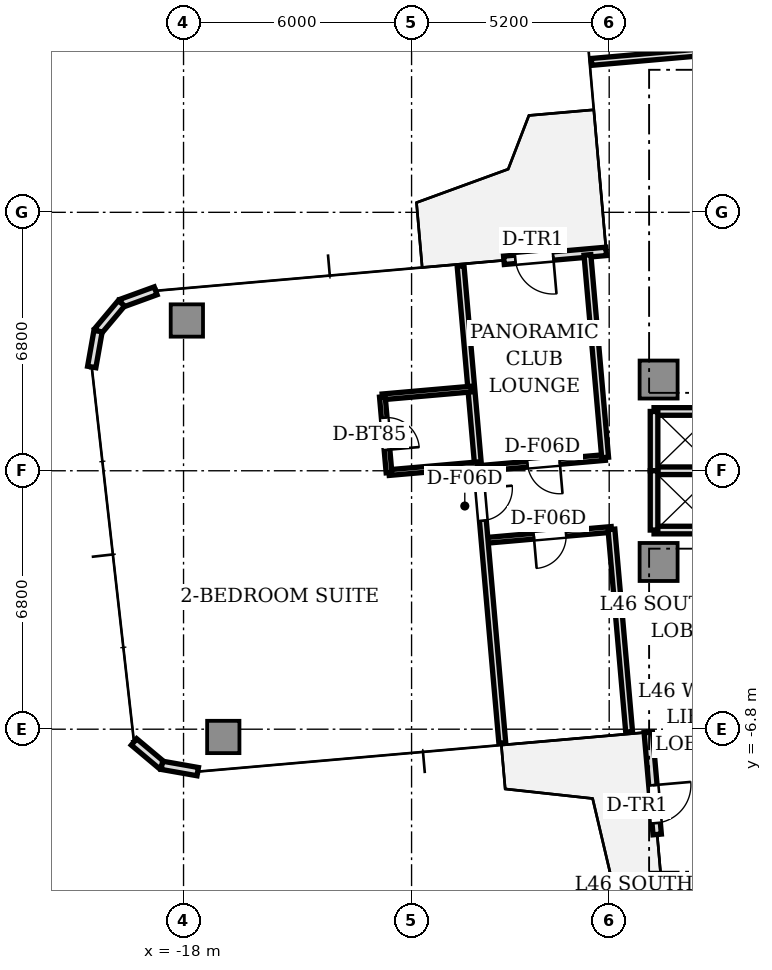
"""IFC4 building model, lengths in metres.
Left out: names, types, materials, properties, quantities, classifications, styles, units other than length and angle.
Written with IfcOpenShell. Run it as: python <this file> out.ifc"""

import sys

from ifc_helpers import new_model, si_unit, direction, frame, frame_2d, origin, origin_2d, place, context, subcontext, project, spatial, rectangle, extrude, source, transform, mapped, element, fill, save


model = new_model("IFC4")
c1 = context("Model", 3, precision=1e-05, world=origin(), true_north=direction((0.0, 1.0)))
c2 = subcontext(c1, "Body", "Model", "MODEL_VIEW")
j1 = project(units=[si_unit("LENGTHUNIT", "METRE"), si_unit("PLANEANGLEUNIT", "RADIAN")], contexts=[c1])
p1 = place(None, origin())
s1 = spatial("IfcSite", under=j1, at=p1, CompositionType="ELEMENT")
p2 = place(p1, origin())
s2 = spatial("IfcBuilding", under=s1, at=p2, CompositionType="ELEMENT")
p3 = place(p2, frame((0.0, 0.0, 167.35)))
s3 = spatial("IfcBuildingStorey", under=s2, at=p3, CompositionType="ELEMENT", Elevation=167.35)
m1 = source(origin(), c2, "Body", "SweptSolid", [
    extrude(rectangle(XDim=1.0, YDim=1.0, at=origin_2d()), origin(), (0.0, 0.0, 1.0), 3.05),
])
for number, where, z_axis, x_axis in (
    (1, (-5.5, 2.4, 0.0), (0.0, 0.0, 1.0), (1.0, 0.0, 0.0)),
    (2, (-5.5, -2.4, 0.0), (0.0, 0.0, 1.0), (1.0, 0.0, 0.0)),
):
    element("IfcColumn", number, at=place(p3, frame(where, z_axis=z_axis, x_axis=x_axis)), inside=s3, PredefinedType="COLUMN", context=c2, shape_type="MappedRepresentation", body=[
        mapped(m1, transform((0.0, 0.0, 0.0), scale=1.0)),
    ])
m2 = source(origin(), c2, "Body", "SweptSolid", [
    extrude(rectangle(XDim=0.85, YDim=0.85, at=origin_2d()), origin(), (0.0, 0.0, 1.0), 3.05),
])
for number, where, z_axis, x_axis in (
    (3, (-17.913, 3.954, 0.0), (0.0, 0.0, 1.0), (1.0, 0.0, 0.0)),
    (4, (-16.954, -7.004, 0.0), (0.0, 0.0, 1.0), (1.0, 0.0, 0.0)),
):
    element("IfcColumn", number, at=place(p3, frame(where, z_axis=z_axis, x_axis=x_axis)), inside=s3, PredefinedType="COLUMN", context=c2, shape_type="MappedRepresentation", body=[
        mapped(m2, transform((0.0, 0.0, 0.0), scale=1.0)),
    ])
p4 = place(p3, frame((-6.879, 5.772, 0.0), z_axis=(0.0, 0.0, 1.0), x_axis=(-0.996193619346, -0.087168071984, 0.0)))
e5 = element("IfcWall", 5, at=p4, inside=s3, PredefinedType="STANDARD", context=c2, shape_type="SweptSolid", body=[
    extrude(rectangle(XDim=2.7, YDim=0.22, at=frame_2d((1.35, 0.0))), origin(), (0.0, 0.0, 1.0), 3.05),
])
p5 = place(p4, frame((1.4, 0.0, 0.0)))
e6 = element("IfcOpeningElement", 6, at=p5, cuts=e5, PredefinedType="OPENING", context=c2, shape_type="SweptSolid", body=[
    extrude(rectangle(XDim=1.0, YDim=2.2, at=frame_2d((0.5, 1.1))), frame((0.0, 0.12, 0.0), z_axis=(0.0, -1.0, 0.0), x_axis=(1.0, 0.0, 0.0)), (0.0, 0.0, 1.0), 0.24),
])
p6 = place(p3, frame((-18.734, 4.735, 0.0), z_axis=(0.0, 0.0, 1.0), x_axis=(-0.939741306239, -0.34188635151, 0.0)))
e7 = element("IfcWall", 7, at=p6, inside=s3, PredefinedType="STANDARD", context=c2, shape_type="SweptSolid", body=[
    extrude(rectangle(XDim=0.958, YDim=0.22, at=frame_2d((0.479, 0.0))), origin(), (0.0, 0.0, 1.0), 3.05),
])
for number, where, z_axis, x_axis in (
    (8, (-19.634, 4.408, 0.0), (0.0, 0.0, 1.0), (-0.643, -0.766, 0.0)),
    (9, (-20.25, 3.674, 0.0), (0.0, 0.0, 1.0), (-0.174, -0.985, 0.0)),
):
    element("IfcWall", number, at=place(p3, frame(where, z_axis=z_axis, x_axis=x_axis)), inside=s3, PredefinedType="STANDARD", context=c2, shape_type="SweptSolid", body=[
        extrude(rectangle(XDim=0.958, YDim=0.22, at=frame_2d((0.479, 0.0))), origin(), (0.0, 0.0, 1.0), 3.05),
    ])
p7 = place(p3, frame((-19.304, -7.135, 0.0), z_axis=(0.0, 0.0, 1.0), x_axis=(0.766001159887, -0.642839189107, 0.0)))
e10 = element("IfcWall", 10, at=p7, inside=s3, PredefinedType="STANDARD", context=c2, shape_type="SweptSolid", body=[
    extrude(rectangle(XDim=0.958, YDim=0.22, at=frame_2d((0.479, 0.0))), origin(), (0.0, 0.0, 1.0), 3.05),
])
p8 = place(p3, frame((-18.57, -7.75, 0.0), z_axis=(0.0, 0.0, 1.0), x_axis=(0.984770724397, -0.173858046606, 0.0)))
e11 = element("IfcWall", 11, at=p8, inside=s3, PredefinedType="STANDARD", context=c2, shape_type="SweptSolid", body=[
    extrude(rectangle(XDim=0.958, YDim=0.22, at=frame_2d((0.479, 0.0))), origin(), (0.0, 0.0, 1.0), 3.05),
])
p9 = place(p3, frame((-5.772, -6.879, 0.0), z_axis=(0.0, 0.0, 1.0), x_axis=(0.087168071984, -0.996193619346, 0.0)))
e12 = element("IfcWall", 12, at=p9, inside=s3, PredefinedType="STANDARD", context=c2, shape_type="SweptSolid", body=[
    extrude(rectangle(XDim=2.7, YDim=0.22, at=frame_2d((1.35, 0.0))), origin(), (0.0, 0.0, 1.0), 3.05),
])
p10 = place(p9, frame((1.4, 0.0, 0.0)))
e13 = element("IfcOpeningElement", 13, at=p10, cuts=e12, PredefinedType="OPENING", context=c2, shape_type="SweptSolid", body=[
    extrude(rectangle(XDim=1.0, YDim=2.2, at=frame_2d((0.5, 1.1))), frame((0.0, 0.12, 0.0), z_axis=(0.0, -1.0, 0.0), x_axis=(1.0, 0.0, 0.0)), (0.0, 0.0, 1.0), 0.24),
])
for number, where, z_axis, x_axis in (
    (14, (-5.62, 1.56, 0.0), (0.0, 0.0, 1.0), (1.0, 0.0, 0.0)),
    (15, (-5.62, -1.56, 0.0), (0.0, 0.0, 1.0), (1.0, 0.0, 0.0)),
    (16, (-5.62, 0.0, 0.0), (0.0, 0.0, 1.0), (1.0, 0.0, 0.0)),
):
    element("IfcWall", number, at=place(p3, frame(where, z_axis=z_axis, x_axis=x_axis)), inside=s3, PredefinedType="SOLIDWALL", context=c2, shape_type="SweptSolid", body=[
        extrude(rectangle(XDim=1.64, YDim=0.2, at=frame_2d((0.82, 0.0))), origin(), (0.0, 0.0, 1.0), 2.6),
    ])
for number, where, z_axis, x_axis in (
    (17, (-5.62, 0.0, 0.0), (0.0, 0.0, 1.0), (0.0, 1.0, 0.0)),
    (18, (-5.62, -1.56, 0.0), (0.0, 0.0, 1.0), (0.0, 1.0, 0.0)),
):
    element("IfcWall", number, at=place(p3, frame(where, z_axis=z_axis, x_axis=x_axis)), inside=s3, PredefinedType="SOLIDWALL", context=c2, shape_type="SweptSolid", body=[
        extrude(rectangle(XDim=1.56, YDim=0.2, at=frame_2d((0.78, 0.0))), origin(), (0.0, 0.0, 1.0), 2.6),
    ])
p11 = place(p3, frame((3.095, 11.664, 0.0), z_axis=(0.0, 0.0, 1.0), x_axis=(-0.996196061386, -0.087140158824, 0.0)))
e19 = element("IfcWall", 19, at=p11, inside=s3, PredefinedType="PARTITIONING", context=c2, shape_type="SweptSolid", body=[
    extrude(rectangle(XDim=10.4, YDim=0.18, at=frame_2d((5.2, 0.0))), origin(), (0.0, 0.0, 1.0), 2.6),
])
p12 = place(p3, frame((-6.741, -1.543, 0.0), z_axis=(0.0, 0.0, 1.0), x_axis=(-0.996193954812, -0.087164238054, 0.0)))
e20 = element("IfcWall", 20, at=p12, inside=s3, PredefinedType="PARTITIONING", context=c2, shape_type="SweptSolid", body=[
    extrude(rectangle(XDim=3.35, YDim=0.15, at=frame_2d((1.675, 0.0))), origin(), (0.0, 0.0, 1.0), 2.6),
])
p13 = place(p12, frame((1.2, 0.0, 0.0)))
e21 = element("IfcOpeningElement", 21, at=p13, cuts=e20, PredefinedType="OPENING", context=c2, shape_type="SweptSolid", body=[
    extrude(rectangle(XDim=0.85, YDim=2.1, at=frame_2d((0.425, 1.05))), frame((0.0, 0.085, 0.0), z_axis=(0.0, -1.0, 0.0), x_axis=(1.0, 0.0, 0.0)), (0.0, 0.0, 1.0), 0.17),
])
p14 = place(p3, frame((-6.907, 0.349, 0.0), z_axis=(0.0, 0.0, 1.0), x_axis=(-0.996193954812, -0.087164238054, 0.0)))
e22 = element("IfcWall", 22, at=p14, inside=s3, PredefinedType="PARTITIONING", context=c2, shape_type="SweptSolid", body=[
    extrude(rectangle(XDim=3.35, YDim=0.15, at=frame_2d((1.675, 0.0))), origin(), (0.0, 0.0, 1.0), 2.6),
])
p15 = place(p14, frame((1.2, 0.0, 0.0)))
e23 = element("IfcOpeningElement", 23, at=p15, cuts=e22, PredefinedType="OPENING", context=c2, shape_type="SweptSolid", body=[
    extrude(rectangle(XDim=0.85, YDim=2.1, at=frame_2d((0.425, 1.05))), frame((0.0, 0.085, 0.0), z_axis=(0.0, -1.0, 0.0), x_axis=(1.0, 0.0, 0.0)), (0.0, 0.0, 1.0), 0.17),
])
for number, where, z_axis, x_axis in (
    (24, (-6.741, -1.543, 0.0), (0.0, 0.0, 1.0), (0.087, -0.996, 0.0)),
    (25, (-7.373, 5.679, 0.0), (0.0, 0.0, 1.0), (0.087, -0.996, 0.0)),
):
    element("IfcWall", number, at=place(p3, frame(where, z_axis=z_axis, x_axis=x_axis)), inside=s3, PredefinedType="PARTITIONING", context=c2, shape_type="SweptSolid", body=[
        extrude(rectangle(XDim=5.35, YDim=0.18, at=frame_2d((2.675, 0.0))), origin(), (0.0, 0.0, 1.0), 2.6),
    ])
p16 = place(p3, frame((-10.71, 5.387, 0.0), z_axis=(0.0, 0.0, 1.0), x_axis=(0.087154691724, -0.996194790044, 0.0)))
e26 = element("IfcWall", 26, at=p16, inside=s3, PredefinedType="PARTITIONING", context=c2, shape_type="SweptSolid", body=[
    extrude(rectangle(XDim=12.6, YDim=0.18, at=frame_2d((6.3, 0.0))), origin(), (0.0, 0.0, 1.0), 2.6),
])
p17 = place(p16, frame((5.875, 0.0, 0.0)))
e27 = element("IfcOpeningElement", 27, at=p17, cuts=e26, PredefinedType="OPENING", context=c2, shape_type="SweptSolid", body=[
    extrude(rectangle(XDim=0.85, YDim=2.1, at=frame_2d((0.425, 1.05))), frame((0.0, 0.1, 0.0), z_axis=(0.0, -1.0, 0.0), x_axis=(1.0, 0.0, 0.0)), (0.0, 0.0, 1.0), 0.2),
])
for number, where, z_axis, x_axis in (
    (28, (-10.253, 0.157, 0.0), (0.0, 0.0, 1.0), (-0.996, -0.087, 0.0)),
    (29, (-10.427, 2.149, 0.0), (0.0, 0.0, 1.0), (-0.996, -0.087, 0.0)),
):
    element("IfcWall", number, at=place(p3, frame(where, z_axis=z_axis, x_axis=x_axis)), inside=s3, PredefinedType="PARTITIONING", context=c2, shape_type="SweptSolid", body=[
        extrude(rectangle(XDim=2.35, YDim=0.15, at=frame_2d((1.175, 0.0))), origin(), (0.0, 0.0, 1.0), 2.6),
    ])
p18 = place(p3, frame((-12.768, 1.945, 0.0), z_axis=(0.0, 0.0, 1.0), x_axis=(0.087156350505, -0.99619464492, 0.0)))
e30 = element("IfcWall", 30, at=p18, inside=s3, PredefinedType="PARTITIONING", context=c2, shape_type="SweptSolid", body=[
    extrude(rectangle(XDim=2.0, YDim=0.15, at=frame_2d((1.0, 0.0))), origin(), (0.0, 0.0, 1.0), 2.6),
])
p19 = place(p18, frame((0.55, 0.0, 0.0)))
e31 = element("IfcOpeningElement", 31, at=p19, cuts=e30, PredefinedType="OPENING", context=c2, shape_type="SweptSolid", body=[
    extrude(rectangle(XDim=0.85, YDim=2.1, at=frame_2d((0.425, 1.05))), frame((0.0, 0.085, 0.0), z_axis=(0.0, -1.0, 0.0), x_axis=(1.0, 0.0, 0.0)), (0.0, 0.0, 1.0), 0.17),
])
p20 = place(p3, frame((-5.287, -11.856, 0.0), z_axis=(0.0, 0.0, 1.0), x_axis=(0.996194023261, 0.087163455754, 0.0)))
e32 = element("IfcWall", 32, at=p20, inside=s3, PredefinedType="PARTITIONING", context=c2, shape_type="SweptSolid", body=[
    extrude(rectangle(XDim=10.4, YDim=0.18, at=frame_2d((5.2, 0.0))), origin(), (0.0, 0.0, 1.0), 2.6),
])
m3 = source(origin(), c2, "Body", "SweptSolid", [
    extrude(rectangle(XDim=1.0, YDim=0.05, at=origin_2d()), origin(), (0.0, 0.0, 1.0), 2.2),
])
p21 = place(p5, frame((0.5, 0.0, 0.0)))
e33 = element("IfcDoor", 33, at=p21, inside=s3, OperationType="SINGLE_SWING_LEFT", PredefinedType="DOOR", context=c2, shape_type="MappedRepresentation", body=[
    mapped(m3, transform((0.0, 0.0, 0.0), scale=1.0)),
])
fill(e6, e33)
p22 = place(p10, frame((0.5, 0.0, 0.0)))
e34 = element("IfcDoor", 34, at=p22, inside=s3, OperationType="SINGLE_SWING_LEFT", PredefinedType="DOOR", context=c2, shape_type="MappedRepresentation", body=[
    mapped(m3, transform((0.0, 0.0, 0.0), scale=1.0)),
])
fill(e13, e34)
m4 = source(origin(), c2, "Body", "SweptSolid", [
    extrude(rectangle(XDim=0.85, YDim=0.05, at=origin_2d()), origin(), (0.0, 0.0, 1.0), 2.1),
])
p23 = place(p13, frame((0.425, 0.0, 0.0)))
e35 = element("IfcDoor", 35, at=p23, inside=s3, OperationType="SINGLE_SWING_RIGHT", PredefinedType="DOOR", context=c2, shape_type="MappedRepresentation", body=[
    mapped(m4, transform((0.0, 0.0, 0.0), scale=1.0)),
])
fill(e21, e35)
p24 = place(p15, frame((0.425, 0.0, 0.0)))
e36 = element("IfcDoor", 36, at=p24, inside=s3, OperationType="SINGLE_SWING_LEFT", PredefinedType="DOOR", context=c2, shape_type="MappedRepresentation", body=[
    mapped(m4, transform((0.0, 0.0, 0.0), scale=1.0)),
])
fill(e23, e36)
p25 = place(p19, frame((0.425, 0.0, 0.0)))
e37 = element("IfcDoor", 37, at=p25, inside=s3, OperationType="SINGLE_SWING_RIGHT", PredefinedType="DOOR", context=c2, shape_type="MappedRepresentation", body=[
    mapped(m4, transform((0.0, 0.0, 0.0), scale=1.0)),
])
fill(e31, e37)
p26 = place(p17, frame((0.425, 0.0, 0.0)))
e38 = element("IfcDoor", 38, at=p26, inside=s3, OperationType="SINGLE_SWING_LEFT", PredefinedType="DOOR", context=c2, shape_type="MappedRepresentation", body=[
    mapped(m4, transform((0.0, 0.0, 0.0), scale=1.0)),
])
fill(e27, e38)
save(model, sys.argv[1])
